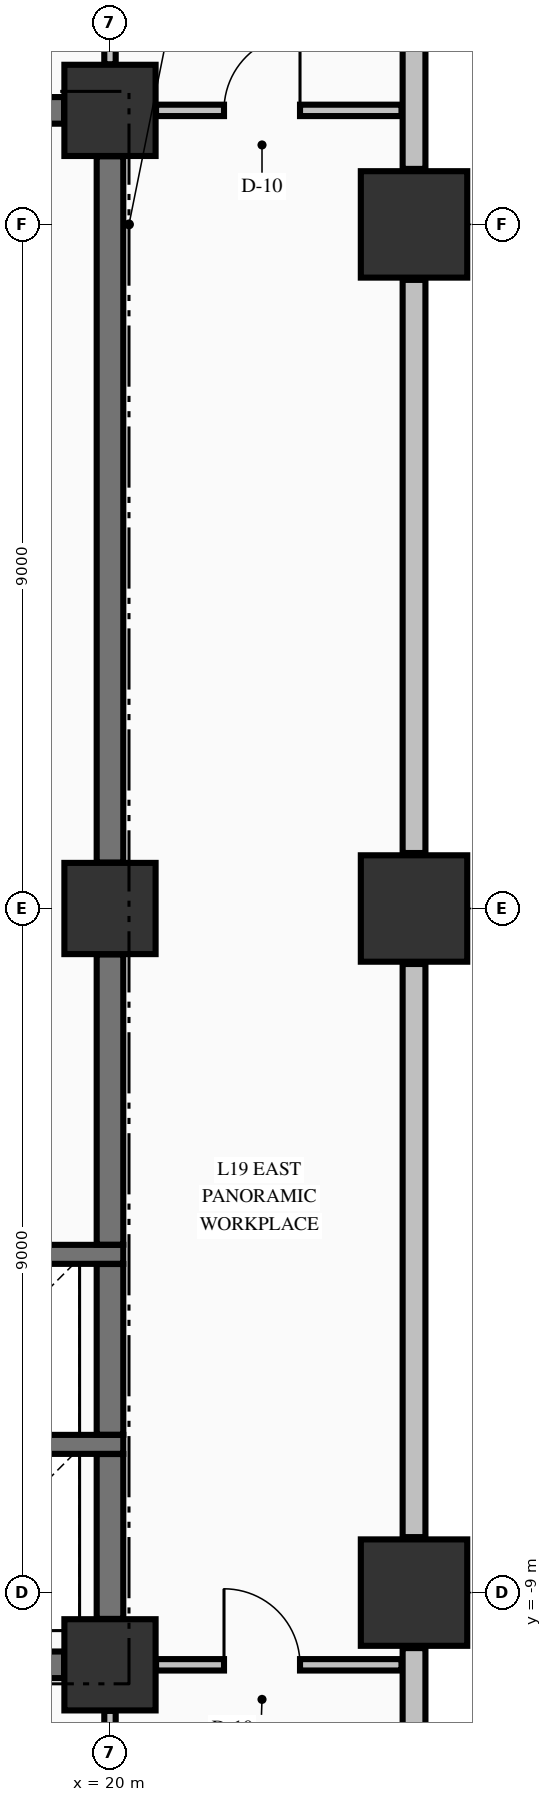
"""IFC4 building model, lengths in metres.
Left out: names, types, materials, properties, quantities, classifications, styles, units other than length and angle.
Written with IfcOpenShell. Run it as: python <this file> out.ifc"""

import sys

from ifc_helpers import new_model, si_unit, direction, frame, frame_2d, origin, origin_2d, place, context, subcontext, project, spatial, rectangle, extrude, element, fill, save


model = new_model("IFC4")
c1 = context("Model", 3, precision=1e-05, world=origin(), true_north=direction((0.0, 1.0)))
c2 = subcontext(c1, "Body", "Model", "MODEL_VIEW")
j1 = project(units=[si_unit("LENGTHUNIT", "METRE"), si_unit("PLANEANGLEUNIT", "RADIAN")], contexts=[c1])
p1 = place(None, origin())
s1 = spatial("IfcSite", under=j1, at=p1, CompositionType="ELEMENT")
p2 = place(p1, origin())
s2 = spatial("IfcBuilding", under=s1, at=p2, CompositionType="ELEMENT")
p3 = place(p2, frame((0.0, 0.0, 78.61)))
s3 = spatial("IfcBuildingStorey", under=s2, at=p3, CompositionType="ELEMENT", Elevation=78.61)
for number, where, z_axis, x_axis in (
    (1, (24.0, -9.0, -0.25), (0.0, 0.0, 1.0), (1.0, 0.0, 0.0)),
    (2, (24.0, 0.0, -0.25), (0.0, 0.0, 1.0), (1.0, 0.0, 0.0)),
    (3, (24.0, 9.0, -0.25), (0.0, 0.0, 1.0), (1.0, 0.0, 0.0)),
):
    element("IfcColumn", number, at=place(p3, frame(where, z_axis=z_axis, x_axis=x_axis)), inside=s3, PredefinedType="COLUMN", context=c2, shape_type="SweptSolid", body=[
        extrude(rectangle(XDim=1.4, YDim=1.4, at=origin_2d()), origin(), (0.0, 0.0, 1.0), 3.395),
    ])
for number, where, z_axis, x_axis in (
    (4, (20.0, -9.95, -0.25), (0.0, 0.0, 1.0), (1.0, 0.0, 0.0)),
    (5, (20.0, 10.5, -0.25), (0.0, 0.0, 1.0), (1.0, 0.0, 0.0)),
    (6, (20.0, 0.0, -0.25), (0.0, 0.0, 1.0), (1.0, 0.0, 0.0)),
):
    element("IfcColumn", number, at=place(p3, frame(where, z_axis=z_axis, x_axis=x_axis)), inside=s3, PredefinedType="COLUMN", context=c2, shape_type="SweptSolid", body=[
        extrude(rectangle(XDim=1.2, YDim=1.2, at=origin_2d()), origin(), (0.0, 0.0, 1.0), 3.395),
    ])
p4 = place(p3, frame((24.0, -22.27, 0.0), z_axis=(0.0, 0.0, 1.0), x_axis=(0.0, 1.0, 0.0)))
e7 = element("IfcWall", 7, at=p4, inside=s3, PredefinedType="STANDARD", context=c2, shape_type="SweptSolid", body=[
    extrude(rectangle(XDim=12.54, YDim=0.3, at=frame_2d((6.27, 0.0))), origin(), (0.0, 0.0, 1.0), 2.537),
])
for number, where, z_axis, x_axis in (
    (8, (24.0, -8.27, 0.0), (0.0, 0.0, 1.0), (0.0, 1.0, 0.0)),
    (9, (24.0, 0.73, 0.0), (0.0, 0.0, 1.0), (0.0, 1.0, 0.0)),
):
    element("IfcWall", number, at=place(p3, frame(where, z_axis=z_axis, x_axis=x_axis)), inside=s3, PredefinedType="STANDARD", context=c2, shape_type="SweptSolid", body=[
        extrude(rectangle(XDim=7.54, YDim=0.3, at=frame_2d((3.77, 0.0))), origin(), (0.0, 0.0, 1.0), 2.537),
    ])
p5 = place(p3, frame((24.0, 9.73, 0.0), z_axis=(0.0, 0.0, 1.0), x_axis=(0.0, 1.0, 0.0)))
e10 = element("IfcWall", 10, at=p5, inside=s3, PredefinedType="STANDARD", context=c2, shape_type="SweptSolid", body=[
    extrude(rectangle(XDim=12.54, YDim=0.3, at=frame_2d((6.27, 0.0))), origin(), (0.0, 0.0, 1.0), 2.537),
])
p6 = place(p3, frame((14.7, -9.95, 0.0), z_axis=(0.0, 0.0, 1.0), x_axis=(1.0, 0.0, 0.0)))
e11 = element("IfcWall", 11, at=p6, inside=s3, PredefinedType="SHEAR", context=c2, shape_type="SweptSolid", body=[
    extrude(rectangle(XDim=4.696, YDim=0.35, at=frame_2d((2.348, 0.0))), origin(), (0.0, 0.0, 1.0), 3.145),
])
p7 = place(p6, frame((0.8, 0.0, 0.0)))
e12 = element("IfcOpeningElement", 12, at=p7, cuts=e11, PredefinedType="OPENING", context=c2, shape_type="SweptSolid", body=[
    extrude(rectangle(XDim=0.9, YDim=2.15, at=frame_2d((0.45, 1.075))), frame((0.0, 0.185, 0.0), z_axis=(0.0, -1.0, 0.0), x_axis=(1.0, 0.0, 0.0)), (0.0, 0.0, 1.0), 0.37),
])
for number, where, z_axis, x_axis in (
    (13, (17.025, -7.05, 0.0), (0.0, 0.0, 1.0), (1.0, 0.0, 0.0)),
    (14, (17.025, -4.55, 0.0), (0.0, 0.0, 1.0), (1.0, 0.0, 0.0)),
):
    element("IfcWall", number, at=place(p3, frame(where, z_axis=z_axis, x_axis=x_axis)), inside=s3, PredefinedType="SOLIDWALL", context=c2, shape_type="SweptSolid", body=[
        extrude(rectangle(XDim=3.15, YDim=0.25, at=frame_2d((1.575, 0.0))), origin(), (0.0, 0.0, 1.0), 3.145),
    ])
p8 = place(p3, frame((14.7, 10.5, 0.0), z_axis=(0.0, 0.0, 1.0), x_axis=(1.0, 0.0, 0.0)))
e15 = element("IfcWall", 15, at=p8, inside=s3, PredefinedType="SHEAR", context=c2, shape_type="SweptSolid", body=[
    extrude(rectangle(XDim=4.696, YDim=0.35, at=frame_2d((2.348, 0.0))), origin(), (0.0, 0.0, 1.0), 3.145),
])
p9 = place(p8, frame((0.85, 0.0, 0.0)))
e16 = element("IfcOpeningElement", 16, at=p9, cuts=e15, PredefinedType="OPENING", context=c2, shape_type="SweptSolid", body=[
    extrude(rectangle(XDim=0.9, YDim=2.15, at=frame_2d((0.45, 1.075))), frame((0.0, 0.185, 0.0), z_axis=(0.0, -1.0, 0.0), x_axis=(1.0, 0.0, 0.0)), (0.0, 0.0, 1.0), 0.37),
])
p10 = place(p8, frame((3.4, 0.0, 0.0)))
e17 = element("IfcOpeningElement", 17, at=p10, cuts=e15, PredefinedType="OPENING", context=c2, shape_type="SweptSolid", body=[
    extrude(rectangle(XDim=0.9, YDim=2.15, at=frame_2d((0.45, 1.075))), frame((0.0, 0.185, 0.0), z_axis=(0.0, -1.0, 0.0), x_axis=(1.0, 0.0, 0.0)), (0.0, 0.0, 1.0), 0.37),
])
p11 = place(p3, frame((20.606, -9.95, 0.0), z_axis=(0.0, 0.0, 1.0), x_axis=(1.0, 0.0, 0.0)))
e18 = element("IfcWall", 18, at=p11, inside=s3, PredefinedType="PARTITIONING", context=c2, shape_type="SweptSolid", body=[
    extrude(rectangle(XDim=3.229, YDim=0.15, at=frame_2d((1.615, 0.0))), origin(), (0.0, 0.0, 1.0), 3.145),
])
p12 = place(p11, frame((0.894, 0.0, 0.0)))
e19 = element("IfcOpeningElement", 19, at=p12, cuts=e18, PredefinedType="OPENING", context=c2, shape_type="SweptSolid", body=[
    extrude(rectangle(XDim=1.0, YDim=2.15, at=frame_2d((0.5, 1.075))), frame((0.0, 0.085, 0.0), z_axis=(0.0, -1.0, 0.0), x_axis=(1.0, 0.0, 0.0)), (0.0, 0.0, 1.0), 0.17),
])
p13 = place(p3, frame((20.606, 10.5, 0.0), z_axis=(0.0, 0.0, 1.0), x_axis=(1.0, 0.0, 0.0)))
e20 = element("IfcWall", 20, at=p13, inside=s3, PredefinedType="PARTITIONING", context=c2, shape_type="SweptSolid", body=[
    extrude(rectangle(XDim=3.229, YDim=0.15, at=frame_2d((1.615, 0.0))), origin(), (0.0, 0.0, 1.0), 3.145),
])
p14 = place(p13, frame((0.894, 0.0, 0.0)))
e21 = element("IfcOpeningElement", 21, at=p14, cuts=e20, PredefinedType="OPENING", context=c2, shape_type="SweptSolid", body=[
    extrude(rectangle(XDim=1.0, YDim=2.15, at=frame_2d((0.5, 1.075))), frame((0.0, 0.085, 0.0), z_axis=(0.0, -1.0, 0.0), x_axis=(1.0, 0.0, 0.0)), (0.0, 0.0, 1.0), 0.17),
])
p15 = place(p3, frame((20.0, -9.346, 0.0), z_axis=(0.0, 0.0, 1.0), x_axis=(0.0, 1.0, 0.0)))
e22 = element("IfcWall", 22, at=p15, inside=s3, PredefinedType="SHEAR", context=c2, shape_type="SweptSolid", body=[
    extrude(rectangle(XDim=2.169, YDim=0.35, at=frame_2d((1.084, 0.0))), origin(), (0.0, 0.0, 1.0), 3.145),
])
p16 = place(p3, frame((20.0, -6.923, 0.0), z_axis=(0.0, 0.0, 1.0), x_axis=(0.0, 1.0, 0.0)))
e23 = element("IfcWall", 23, at=p16, inside=s3, PredefinedType="SHEAR", context=c2, shape_type="SweptSolid", body=[
    extrude(rectangle(XDim=2.246, YDim=0.35, at=frame_2d((1.123, 0.0))), origin(), (0.0, 0.0, 1.0), 3.145),
])
p17 = place(p3, frame((20.0, -4.423, 0.0), z_axis=(0.0, 0.0, 1.0), x_axis=(0.0, 1.0, 0.0)))
e24 = element("IfcWall", 24, at=p17, inside=s3, PredefinedType="SHEAR", context=c2, shape_type="SweptSolid", body=[
    extrude(rectangle(XDim=3.819, YDim=0.35, at=frame_2d((1.91, 0.0))), origin(), (0.0, 0.0, 1.0), 3.145),
])
p18 = place(p3, frame((20.0, 0.604, 0.0), z_axis=(0.0, 0.0, 1.0), x_axis=(0.0, 1.0, 0.0)))
e25 = element("IfcWall", 25, at=p18, inside=s3, PredefinedType="SHEAR", context=c2, shape_type="SweptSolid", body=[
    extrude(rectangle(XDim=9.292, YDim=0.35, at=frame_2d((4.646, 0.0))), origin(), (0.0, 0.0, 1.0), 3.145),
])
p19 = place(p3, frame((20.0, -12.472, 0.0), z_axis=(0.0, 0.0, 1.0), x_axis=(0.0, 1.0, 0.0)))
e26 = element("IfcWall", 26, at=p19, inside=s3, PredefinedType="PARTITIONING", context=c2, shape_type="SweptSolid", body=[
    extrude(rectangle(XDim=1.916, YDim=0.15, at=frame_2d((0.958, 0.0))), origin(), (0.0, 0.0, 1.0), 3.145),
])
p20 = place(p19, frame((0.747, 0.0, 0.0)))
e27 = element("IfcOpeningElement", 27, at=p20, cuts=e26, PredefinedType="OPENING", context=c2, shape_type="SweptSolid", body=[
    extrude(rectangle(XDim=0.95, YDim=2.15, at=frame_2d((0.475, 1.075))), frame((0.0, 0.085, 0.0), z_axis=(0.0, -1.0, 0.0), x_axis=(1.0, 0.0, 0.0)), (0.0, 0.0, 1.0), 0.17),
])
p21 = place(p3, frame((20.0, 11.106, 0.0), z_axis=(0.0, 0.0, 1.0), x_axis=(0.0, 1.0, 0.0)))
e28 = element("IfcWall", 28, at=p21, inside=s3, PredefinedType="PARTITIONING", context=c2, shape_type="SweptSolid", body=[
    extrude(rectangle(XDim=2.616, YDim=0.15, at=frame_2d((1.308, 0.0))), origin(), (0.0, 0.0, 1.0), 3.145),
])
p22 = place(p21, frame((0.569, 0.0, 0.0)))
e29 = element("IfcOpeningElement", 29, at=p22, cuts=e28, PredefinedType="OPENING", context=c2, shape_type="SweptSolid", body=[
    extrude(rectangle(XDim=0.95, YDim=2.15, at=frame_2d((0.475, 1.075))), frame((0.0, 0.085, 0.0), z_axis=(0.0, -1.0, 0.0), x_axis=(1.0, 0.0, 0.0)), (0.0, 0.0, 1.0), 0.17),
])
p23 = place(p14, origin())
e30 = element("IfcDoor", 30, at=p23, inside=s3, OperationType="SINGLE_SWING_RIGHT", PredefinedType="DOOR", context=c2, shape_type="SweptSolid", body=[
    extrude(rectangle(XDim=1.0, YDim=2.15, at=frame_2d((0.5, 1.075))), frame((0.0, 0.025, 0.0), z_axis=(0.0, -1.0, 0.0), x_axis=(1.0, 0.0, 0.0)), (0.0, 0.0, 1.0), 0.05),
])
fill(e21, e30)
p24 = place(p12, origin())
e31 = element("IfcDoor", 31, at=p24, inside=s3, OperationType="SINGLE_SWING_LEFT", PredefinedType="DOOR", context=c2, shape_type="SweptSolid", body=[
    extrude(rectangle(XDim=1.0, YDim=2.15, at=frame_2d((0.5, 1.075))), frame((0.0, 0.025, 0.0), z_axis=(0.0, -1.0, 0.0), x_axis=(1.0, 0.0, 0.0)), (0.0, 0.0, 1.0), 0.05),
])
fill(e19, e31)
save(model, sys.argv[1])
